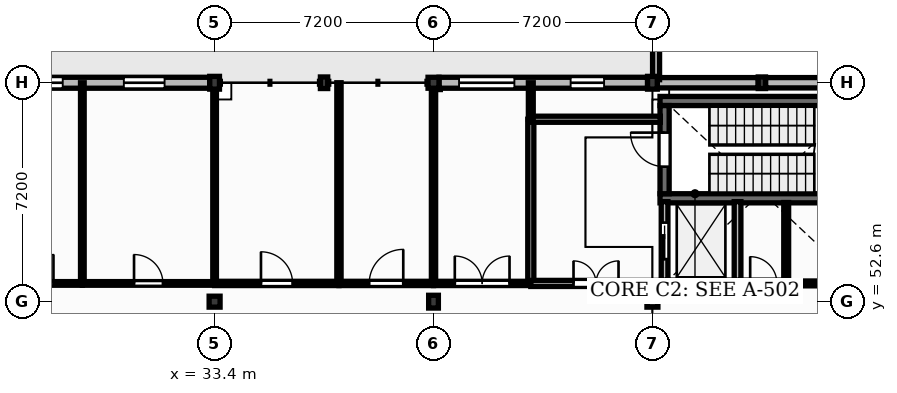
"""IFC4 building model, lengths in metres.
Left out: names, types, materials, properties, quantities, classifications, styles, units other than length and angle.
Written with IfcOpenShell. Run it as: python <this file> out.ifc"""

import sys

from ifc_helpers import new_model, si_unit, direction, frame, frame_2d, origin, origin_2d, place, context, subcontext, project, spatial, rectangle, extrude, element, fill, save


model = new_model("IFC4")
c1 = context("Model", 3, precision=1e-05, world=origin(), true_north=direction((0.0, 1.0)))
c2 = subcontext(c1, "Body", "Model", "MODEL_VIEW")
j1 = project(units=[si_unit("LENGTHUNIT", "METRE"), si_unit("PLANEANGLEUNIT", "RADIAN")], contexts=[c1])
p1 = place(None, origin())
s1 = spatial("IfcSite", under=j1, at=p1, CompositionType="ELEMENT")
p2 = place(p1, origin())
s2 = spatial("IfcBuilding", under=s1, at=p2, CompositionType="ELEMENT")
p3 = place(p2, frame((0.0, 0.0, 4.5)))
s3 = spatial("IfcBuildingStorey", under=s2, at=p3, CompositionType="ELEMENT", Elevation=4.5)
p4 = place(p3, frame((33.4, 52.6, 0.0), z_axis=(0.0, 0.0, 1.0), x_axis=(1.0, 0.0, 0.0)))
e1 = element("IfcColumn", 1, at=p4, inside=s3, PredefinedType="COLUMN", context=c2, shape_type="SweptSolid", body=[
    extrude(rectangle(XDim=0.36, YDim=0.36, at=origin_2d()), origin(), (0.0, 0.0, 1.0), 4.26),
])
for number, where, z_axis, x_axis in (
    (2, (33.4, 59.8, 0.0), (0.0, 0.0, 1.0), (1.0, 0.0, 0.0)),
    (3, (40.6, 52.6, 0.0), (0.0, 0.0, 1.0), (1.0, 0.0, 0.0)),
):
    element("IfcColumn", number, at=place(p3, frame(where, z_axis=z_axis, x_axis=x_axis)), inside=s3, PredefinedType="COLUMN", context=c2, shape_type="SweptSolid", body=[
        extrude(rectangle(XDim=0.32, YDim=0.42, at=origin_2d()), origin(), (0.0, 0.0, 1.0), 4.26),
    ])
for number, where, z_axis, x_axis in (
    (4, (40.6, 59.8, 0.0), (0.0, 0.0, 1.0), (1.0, 0.0, 0.0)),
    (5, (47.8, 52.6, 0.0), (0.0, 0.0, 1.0), (1.0, 0.0, 0.0)),
):
    element("IfcColumn", number, at=place(p3, frame(where, z_axis=z_axis, x_axis=x_axis)), inside=s3, PredefinedType="COLUMN", context=c2, shape_type="SweptSolid", body=[
        extrude(rectangle(XDim=0.36, YDim=0.36, at=origin_2d()), origin(), (0.0, 0.0, 1.0), 4.26),
    ])
p5 = place(p3, frame((47.8, 59.8, 0.0), z_axis=(0.0, 0.0, 1.0), x_axis=(1.0, 0.0, 0.0)))
e6 = element("IfcColumn", 6, at=p5, inside=s3, PredefinedType="COLUMN", context=c2, shape_type="SweptSolid", body=[
    extrude(rectangle(XDim=0.32, YDim=0.42, at=origin_2d()), origin(), (0.0, 0.0, 1.0), 4.26),
])
for number, where, z_axis, x_axis in (
    (7, (37.0, 59.8, 0.0), (0.0, 0.0, 1.0), (1.0, 0.0, 0.0)),
    (8, (51.4, 59.8, 0.0), (0.0, 0.0, 1.0), (1.0, 0.0, 0.0)),
):
    element("IfcColumn", number, at=place(p3, frame(where, z_axis=z_axis, x_axis=x_axis)), inside=s3, PredefinedType="PILASTER", context=c2, shape_type="SweptSolid", body=[
        extrude(rectangle(XDim=0.24, YDim=0.38, at=origin_2d()), origin(), (0.0, 0.0, 1.0), 4.26),
    ])
p6 = place(p3, frame((26.38, 59.8, 0.0), z_axis=(0.0, 0.0, 1.0), x_axis=(1.0, 0.0, 0.0)))
e9 = element("IfcWall", 9, at=p6, inside=s3, PredefinedType="SOLIDWALL", context=c2, shape_type="SweptSolid", body=[
    extrude(rectangle(XDim=6.86, YDim=0.36, at=frame_2d((3.43, 0.0))), origin(), (0.0, 0.0, 1.0), 3.8),
])
p7 = place(p6, frame((0.765, 0.0, 1.05)))
e10 = element("IfcOpeningElement", 10, at=p7, cuts=e9, PredefinedType="OPENING", context=c2, shape_type="SweptSolid", body=[
    extrude(rectangle(XDim=1.26, YDim=1.65, at=frame_2d((0.63, 0.825))), frame((0.0, 0.19, 0.0), z_axis=(0.0, -1.0, 0.0), x_axis=(1.0, 0.0, 0.0)), (0.0, 0.0, 1.0), 0.38),
])
p8 = place(p6, frame((4.035, 0.0, 1.0)))
e11 = element("IfcOpeningElement", 11, at=p8, cuts=e9, PredefinedType="OPENING", context=c2, shape_type="SweptSolid", body=[
    extrude(rectangle(XDim=1.34, YDim=1.95, at=frame_2d((0.67, 0.975))), frame((0.0, 0.19, 0.0), z_axis=(0.0, -1.0, 0.0), x_axis=(1.0, 0.0, 0.0)), (0.0, 0.0, 1.0), 0.38),
])
p9 = place(p3, frame((40.78, 59.8, 0.0), z_axis=(0.0, 0.0, 1.0), x_axis=(1.0, 0.0, 0.0)))
e12 = element("IfcWall", 12, at=p9, inside=s3, PredefinedType="SOLIDWALL", context=c2, shape_type="SweptSolid", body=[
    extrude(rectangle(XDim=6.86, YDim=0.36, at=frame_2d((3.43, 0.0))), origin(), (0.0, 0.0, 1.0), 3.8),
])
p10 = place(p9, frame((0.66, 0.0, 1.05)))
e13 = element("IfcOpeningElement", 13, at=p10, cuts=e12, PredefinedType="OPENING", context=c2, shape_type="SweptSolid", body=[
    extrude(rectangle(XDim=1.82, YDim=1.65, at=frame_2d((0.91, 0.825))), frame((0.0, 0.19, 0.0), z_axis=(0.0, -1.0, 0.0), x_axis=(1.0, 0.0, 0.0)), (0.0, 0.0, 1.0), 0.38),
])
p11 = place(p9, frame((4.33, 0.0, 1.0)))
e14 = element("IfcOpeningElement", 14, at=p11, cuts=e12, PredefinedType="OPENING", context=c2, shape_type="SweptSolid", body=[
    extrude(rectangle(XDim=1.1, YDim=1.8, at=frame_2d((0.55, 0.9))), frame((0.0, 0.19, 0.0), z_axis=(0.0, -1.0, 0.0), x_axis=(1.0, 0.0, 0.0)), (0.0, 0.0, 1.0), 0.38),
])
p12 = place(p3, frame((47.96, 59.8, 0.0), z_axis=(0.0, 0.0, 1.0), x_axis=(1.0, 0.0, 0.0)))
e15 = element("IfcWall", 15, at=p12, inside=s3, PredefinedType="SOLIDWALL", context=c2, shape_type="SweptSolid", body=[
    extrude(rectangle(XDim=3.32, YDim=0.34, at=frame_2d((1.66, 0.0))), origin(), (0.0, 0.0, 1.0), 3.8),
])
p13 = place(p3, frame((51.52, 59.8, 0.0), z_axis=(0.0, 0.0, 1.0), x_axis=(1.0, 0.0, 0.0)))
e16 = element("IfcWall", 16, at=p13, inside=s3, PredefinedType="SOLIDWALL", context=c2, shape_type="SweptSolid", body=[
    extrude(rectangle(XDim=3.3, YDim=0.34, at=frame_2d((1.65, 0.0))), origin(), (0.0, 0.0, 1.0), 3.8),
])
p14 = place(p3, frame((47.92, 59.9, -0.05), z_axis=(0.0, 0.0, 1.0), x_axis=(0.0, 1.0, 0.0)))
e17 = element("IfcWall", 17, at=p14, inside=s3, PredefinedType="PARAPET", context=c2, shape_type="SweptSolid", body=[
    extrude(rectangle(XDim=1.68, YDim=0.23, at=frame_2d((0.84, 0.0))), origin(), (0.0, 0.0, 1.0), 0.8),
])
for number, where, z_axis, x_axis in (
    (18, (48.05, 56.0, 0.0), (0.0, 0.0, 1.0), (1.0, 0.0, 0.0)),
    (19, (48.05, 59.2, 0.0), (0.0, 0.0, 1.0), (1.0, 0.0, 0.0)),
):
    element("IfcWall", number, at=place(p3, frame(where, z_axis=z_axis, x_axis=x_axis)), inside=s3, PredefinedType="SHEAR", context=c2, shape_type="SweptSolid", body=[
        extrude(rectangle(XDim=6.7, YDim=0.3, at=frame_2d((3.35, 0.0))), origin(), (0.0, 0.0, 1.0), 4.25),
    ])
p15 = place(p3, frame((48.2, 56.15, 0.0), z_axis=(0.0, 0.0, 1.0), x_axis=(0.0, 1.0, 0.0)))
e20 = element("IfcWall", 20, at=p15, inside=s3, PredefinedType="SHEAR", context=c2, shape_type="SweptSolid", body=[
    extrude(rectangle(XDim=2.9, YDim=0.3, at=frame_2d((1.45, 0.0))), origin(), (0.0, 0.0, 1.0), 4.25),
])
p16 = place(p15, frame((0.89, 0.0, 0.0)))
e21 = element("IfcOpeningElement", 21, at=p16, cuts=e20, PredefinedType="OPENING", context=c2, shape_type="SweptSolid", body=[
    extrude(rectangle(XDim=1.12, YDim=2.1, at=frame_2d((0.56, 1.05))), frame((0.0, 0.16, 0.0), z_axis=(0.0, -1.0, 0.0), x_axis=(1.0, 0.0, 0.0)), (0.0, 0.0, 1.0), 0.32),
])
p17 = place(p3, frame((48.2, 53.2, 0.0), z_axis=(0.0, 0.0, 1.0), x_axis=(1.0, 0.0, 0.0)))
e22 = element("IfcWall", 22, at=p17, inside=s3, PredefinedType="SOLIDWALL", context=c2, shape_type="SweptSolid", body=[
    extrude(rectangle(XDim=2.4, YDim=0.22, at=frame_2d((1.2, 0.0))), origin(), (0.0, 0.0, 1.0), 4.25),
])
p18 = place(p3, frame((48.2, 53.31, 0.0), z_axis=(0.0, 0.0, 1.0), x_axis=(0.0, 1.0, 0.0)))
e23 = element("IfcWall", 23, at=p18, inside=s3, PredefinedType="SOLIDWALL", context=c2, shape_type="SweptSolid", body=[
    extrude(rectangle(XDim=2.58, YDim=0.22, at=frame_2d((1.29, 0.0))), origin(), (0.0, 0.0, 1.0), 4.25),
])
p19 = place(p18, frame((0.69, 0.0, 0.0)))
e24 = element("IfcOpeningElement", 24, at=p19, cuts=e23, PredefinedType="OPENING", context=c2, shape_type="SweptSolid", body=[
    extrude(rectangle(XDim=1.2, YDim=2.15, at=frame_2d((0.6, 1.075))), frame((0.0, 0.12, 0.0), z_axis=(0.0, -1.0, 0.0), x_axis=(1.0, 0.0, 0.0)), (0.0, 0.0, 1.0), 0.24),
])
p20 = place(p3, frame((50.6, 53.31, 0.0), z_axis=(0.0, 0.0, 1.0), x_axis=(0.0, 1.0, 0.0)))
e25 = element("IfcWall", 25, at=p20, inside=s3, PredefinedType="SOLIDWALL", context=c2, shape_type="SweptSolid", body=[
    extrude(rectangle(XDim=2.58, YDim=0.22, at=frame_2d((1.29, 0.0))), origin(), (0.0, 0.0, 1.0), 4.25),
])
p21 = place(p3, frame((26.2, 53.2, 0.0), z_axis=(0.0, 0.0, 1.0), x_axis=(1.0, 0.0, 0.0)))
e26 = element("IfcWall", 26, at=p21, inside=s3, PredefinedType="PLUMBINGWALL", context=c2, shape_type="SweptSolid", body=[
    extrude(rectangle(XDim=2.85, YDim=0.12, at=frame_2d((1.425, 0.0))), origin(), (0.0, 0.0, 1.0), 4.18),
])
p22 = place(p21, frame((0.95, 0.0, 0.0)))
e27 = element("IfcOpeningElement", 27, at=p22, cuts=e26, PredefinedType="OPENING", context=c2, shape_type="SweptSolid", body=[
    extrude(rectangle(XDim=0.95, YDim=2.1, at=frame_2d((0.475, 1.05))), frame((0.0, 0.07, 0.0), z_axis=(0.0, -1.0, 0.0), x_axis=(1.0, 0.0, 0.0)), (0.0, 0.0, 1.0), 0.14),
])
p23 = place(p3, frame((29.05, 53.27, 0.0), z_axis=(0.0, 0.0, 1.0), x_axis=(0.0, 1.0, 0.0)))
e28 = element("IfcWall", 28, at=p23, inside=s3, PredefinedType="PLUMBINGWALL", context=c2, shape_type="SweptSolid", body=[
    extrude(rectangle(XDim=6.53, YDim=0.12, at=frame_2d((3.265, 0.0))), origin(), (0.0, 0.0, 1.0), 4.18),
])
p24 = place(p3, frame((29.05, 53.2, 0.0), z_axis=(0.0, 0.0, 1.0), x_axis=(1.0, 0.0, 0.0)))
e29 = element("IfcWall", 29, at=p24, inside=s3, PredefinedType="PLUMBINGWALL", context=c2, shape_type="SweptSolid", body=[
    extrude(rectangle(XDim=4.35, YDim=0.12, at=frame_2d((2.175, 0.0))), origin(), (0.0, 0.0, 1.0), 4.18),
])
p25 = place(p24, frame((1.7, 0.0, 0.0)))
e30 = element("IfcOpeningElement", 30, at=p25, cuts=e29, PredefinedType="OPENING", context=c2, shape_type="SweptSolid", body=[
    extrude(rectangle(XDim=0.95, YDim=2.1, at=frame_2d((0.475, 1.05))), frame((0.0, 0.07, 0.0), z_axis=(0.0, -1.0, 0.0), x_axis=(1.0, 0.0, 0.0)), (0.0, 0.0, 1.0), 0.14),
])
p26 = place(p3, frame((33.4, 53.27, 0.0), z_axis=(0.0, 0.0, 1.0), x_axis=(0.0, 1.0, 0.0)))
e31 = element("IfcWall", 31, at=p26, inside=s3, PredefinedType="PLUMBINGWALL", context=c2, shape_type="SweptSolid", body=[
    extrude(rectangle(XDim=6.32, YDim=0.12, at=frame_2d((3.16, 0.0))), origin(), (0.0, 0.0, 1.0), 3.74),
])
p27 = place(p3, frame((33.4, 53.2, 0.0), z_axis=(0.0, 0.0, 1.0), x_axis=(1.0, 0.0, 0.0)))
e32 = element("IfcWall", 32, at=p27, inside=s3, PredefinedType="PARTITIONING", context=c2, shape_type="SweptSolid", body=[
    extrude(rectangle(XDim=4.09, YDim=0.14, at=frame_2d((2.045, 0.0))), origin(), (0.0, 0.0, 1.0), 4.18),
])
p28 = place(p27, frame((1.525, 0.0, 0.0)))
e33 = element("IfcOpeningElement", 33, at=p28, cuts=e32, PredefinedType="OPENING", context=c2, shape_type="SweptSolid", body=[
    extrude(rectangle(XDim=1.04, YDim=2.1, at=frame_2d((0.52, 1.05))), frame((0.0, 0.08, 0.0), z_axis=(0.0, -1.0, 0.0), x_axis=(1.0, 0.0, 0.0)), (0.0, 0.0, 1.0), 0.16),
])
p29 = place(p3, frame((37.49, 53.27, 0.0), z_axis=(0.0, 0.0, 1.0), x_axis=(0.0, 1.0, 0.0)))
e34 = element("IfcWall", 34, at=p29, inside=s3, PredefinedType="PARTITIONING", context=c2, shape_type="SweptSolid", body=[
    extrude(rectangle(XDim=6.53, YDim=0.14, at=frame_2d((3.265, 0.0))), origin(), (0.0, 0.0, 1.0), 4.18),
])
p30 = place(p3, frame((37.49, 53.2, 0.0), z_axis=(0.0, 0.0, 1.0), x_axis=(1.0, 0.0, 0.0)))
e35 = element("IfcWall", 35, at=p30, inside=s3, PredefinedType="PARTITIONING", context=c2, shape_type="SweptSolid", body=[
    extrude(rectangle(XDim=3.11, YDim=0.14, at=frame_2d((1.555, 0.0))), origin(), (0.0, 0.0, 1.0), 4.18),
])
p31 = place(p30, frame((0.995, 0.0, 0.0)))
e36 = element("IfcOpeningElement", 36, at=p31, cuts=e35, PredefinedType="OPENING", context=c2, shape_type="SweptSolid", body=[
    extrude(rectangle(XDim=1.12, YDim=2.15, at=frame_2d((0.56, 1.075))), frame((0.0, 0.08, 0.0), z_axis=(0.0, -1.0, 0.0), x_axis=(1.0, 0.0, 0.0)), (0.0, 0.0, 1.0), 0.16),
])
p32 = place(p3, frame((40.6, 53.27, 0.0), z_axis=(0.0, 0.0, 1.0), x_axis=(0.0, 1.0, 0.0)))
e37 = element("IfcWall", 37, at=p32, inside=s3, PredefinedType="PARTITIONING", context=c2, shape_type="SweptSolid", body=[
    extrude(rectangle(XDim=6.35, YDim=0.14, at=frame_2d((3.175, 0.0))), origin(), (0.0, 0.0, 1.0), 3.74),
])
p33 = place(p3, frame((40.6, 53.2, 0.0), z_axis=(0.0, 0.0, 1.0), x_axis=(1.0, 0.0, 0.0)))
e38 = element("IfcWall", 38, at=p33, inside=s3, PredefinedType="PARTITIONING", context=c2, shape_type="SweptSolid", body=[
    extrude(rectangle(XDim=3.2, YDim=0.14, at=frame_2d((1.6, 0.0))), origin(), (0.0, 0.0, 1.0), 4.18),
])
p34 = place(p33, frame((0.7, 0.0, 0.0)))
e39 = element("IfcOpeningElement", 39, at=p34, cuts=e38, PredefinedType="OPENING", context=c2, shape_type="SweptSolid", body=[
    extrude(rectangle(XDim=1.8, YDim=2.3, at=frame_2d((0.9, 1.15))), frame((0.0, 0.08, 0.0), z_axis=(0.0, -1.0, 0.0), x_axis=(1.0, 0.0, 0.0)), (0.0, 0.0, 1.0), 0.16),
])
p35 = place(p3, frame((43.8, 53.27, 0.0), z_axis=(0.0, 0.0, 1.0), x_axis=(0.0, 1.0, 0.0)))
e40 = element("IfcWall", 40, at=p35, inside=s3, PredefinedType="PARTITIONING", context=c2, shape_type="SweptSolid", body=[
    extrude(rectangle(XDim=5.33, YDim=0.2, at=frame_2d((2.665, 0.0))), origin(), (0.0, 0.0, 1.0), 4.18),
])
p36 = place(p3, frame((43.8, 53.2, 0.0), z_axis=(0.0, 0.0, 1.0), x_axis=(1.0, 0.0, 0.0)))
e41 = element("IfcWall", 41, at=p36, inside=s3, PredefinedType="PARTITIONING", context=c2, shape_type="SweptSolid", body=[
    extrude(rectangle(XDim=4.29, YDim=0.2, at=frame_2d((2.145, 0.0))), origin(), (0.0, 0.0, 1.0), 4.18),
])
p37 = place(p36, frame((1.405, 0.0, 0.0)))
e42 = element("IfcOpeningElement", 42, at=p37, cuts=e41, PredefinedType="OPENING", context=c2, shape_type="SweptSolid", body=[
    extrude(rectangle(XDim=1.48, YDim=2.25, at=frame_2d((0.74, 1.125))), frame((0.0, 0.11, 0.0), z_axis=(0.0, -1.0, 0.0), x_axis=(1.0, 0.0, 0.0)), (0.0, 0.0, 1.0), 0.22),
])
p38 = place(p3, frame((50.71, 53.2, 0.0), z_axis=(0.0, 0.0, 1.0), x_axis=(1.0, 0.0, 0.0)))
e43 = element("IfcWall", 43, at=p38, inside=s3, PredefinedType="SOLIDWALL", context=c2, shape_type="SweptSolid", body=[
    extrude(rectangle(XDim=1.49, YDim=0.22, at=frame_2d((0.745, 0.0))), origin(), (0.0, 0.0, 1.0), 4.18),
])
p39 = place(p38, frame((0.305, 0.0, 0.0)))
e44 = element("IfcOpeningElement", 44, at=p39, cuts=e43, PredefinedType="OPENING", context=c2, shape_type="SweptSolid", body=[
    extrude(rectangle(XDim=0.88, YDim=2.05, at=frame_2d((0.44, 1.025))), frame((0.0, 0.12, 0.0), z_axis=(0.0, -1.0, 0.0), x_axis=(1.0, 0.0, 0.0)), (0.0, 0.0, 1.0), 0.24),
])
p40 = place(p3, frame((52.2, 53.27, 0.0), z_axis=(0.0, 0.0, 1.0), x_axis=(0.0, 1.0, 0.0)))
e45 = element("IfcWall", 45, at=p40, inside=s3, PredefinedType="PARTITIONING", context=c2, shape_type="SweptSolid", body=[
    extrude(rectangle(XDim=2.59, YDim=0.16, at=frame_2d((1.295, 0.0))), origin(), (0.0, 0.0, 1.0), 4.18),
])
p41 = place(p3, frame((48.06, 58.6, 0.0), z_axis=(0.0, 0.0, 1.0), x_axis=(-1.0, 0.0, 0.0)))
e46 = element("IfcWall", 46, at=p41, inside=s3, PredefinedType="PARTITIONING", context=c2, shape_type="SweptSolid", body=[
    extrude(rectangle(XDim=4.26, YDim=0.2, at=frame_2d((2.13, 0.0))), origin(), (0.0, 0.0, 1.0), 4.18),
])
p42 = place(p3, frame((55.0, 53.2, 0.0), z_axis=(0.0, 0.0, 1.0), x_axis=(-1.0, 0.0, 0.0)))
e47 = element("IfcWall", 47, at=p42, inside=s3, PredefinedType="PARTITIONING", context=c2, shape_type="SweptSolid", body=[
    extrude(rectangle(XDim=2.8, YDim=0.16, at=frame_2d((1.4, 0.0))), origin(), (0.0, 0.0, 1.0), 4.18),
])
p43 = place(p3, frame((43.8, 58.6, 0.0), z_axis=(0.0, 0.0, 1.0), x_axis=(0.0, 1.0, 0.0)))
e48 = element("IfcWall", 48, at=p43, inside=s3, PredefinedType="PARTITIONING", context=c2, shape_type="SweptSolid", body=[
    extrude(rectangle(XDim=1.2, YDim=0.16, at=frame_2d((0.6, 0.0))), origin(), (0.0, 0.0, 1.0), 4.18),
])
p44 = place(p7, origin())
e49 = element("IfcWindow", 49, at=p44, inside=s3, PartitioningType="SINGLE_PANEL", PredefinedType="WINDOW", context=c2, shape_type="SweptSolid", body=[
    extrude(rectangle(XDim=1.26, YDim=1.65, at=frame_2d((0.63, 0.825))), frame((0.0, 0.03, 0.0), z_axis=(0.0, -1.0, 0.0), x_axis=(1.0, 0.0, 0.0)), (0.0, 0.0, 1.0), 0.06),
])
fill(e10, e49)
p45 = place(p8, origin())
e50 = element("IfcWindow", 50, at=p45, inside=s3, PartitioningType="SINGLE_PANEL", PredefinedType="WINDOW", context=c2, shape_type="SweptSolid", body=[
    extrude(rectangle(XDim=1.34, YDim=1.95, at=frame_2d((0.67, 0.975))), frame((0.0, 0.03, 0.0), z_axis=(0.0, -1.0, 0.0), x_axis=(1.0, 0.0, 0.0)), (0.0, 0.0, 1.0), 0.06),
])
fill(e11, e50)
p46 = place(p10, origin())
e51 = element("IfcWindow", 51, at=p46, inside=s3, PartitioningType="DOUBLE_PANEL_VERTICAL", PredefinedType="WINDOW", context=c2, shape_type="SweptSolid", body=[
    extrude(rectangle(XDim=1.82, YDim=1.65, at=frame_2d((0.91, 0.825))), frame((0.0, 0.03, 0.0), z_axis=(0.0, -1.0, 0.0), x_axis=(1.0, 0.0, 0.0)), (0.0, 0.0, 1.0), 0.06),
])
fill(e13, e51)
p47 = place(p11, origin())
e52 = element("IfcWindow", 52, at=p47, inside=s3, PartitioningType="SINGLE_PANEL", PredefinedType="WINDOW", context=c2, shape_type="SweptSolid", body=[
    extrude(rectangle(XDim=1.1, YDim=1.8, at=frame_2d((0.55, 0.9))), frame((0.0, 0.03, 0.0), z_axis=(0.0, -1.0, 0.0), x_axis=(1.0, 0.0, 0.0)), (0.0, 0.0, 1.0), 0.06),
])
fill(e14, e52)
p48 = place(p19, origin())
e53 = element("IfcDoor", 53, at=p48, inside=s3, OperationType="SLIDING_TO_LEFT", PredefinedType="DOOR", context=c2, shape_type="SweptSolid", body=[
    extrude(rectangle(XDim=1.2, YDim=2.15, at=frame_2d((0.6, 1.075))), frame((0.0, 0.025, 0.0), z_axis=(0.0, -1.0, 0.0), x_axis=(1.0, 0.0, 0.0)), (0.0, 0.0, 1.0), 0.05),
])
fill(e24, e53)
p49 = place(p16, origin())
e54 = element("IfcDoor", 54, at=p49, inside=s3, OperationType="SINGLE_SWING_RIGHT", PredefinedType="DOOR", context=c2, shape_type="SweptSolid", body=[
    extrude(rectangle(XDim=1.12, YDim=2.1, at=frame_2d((0.56, 1.05))), frame((0.0, 0.025, 0.0), z_axis=(0.0, -1.0, 0.0), x_axis=(1.0, 0.0, 0.0)), (0.0, 0.0, 1.0), 0.05),
])
fill(e21, e54)
p50 = place(p37, origin())
e55 = element("IfcDoor", 55, at=p50, inside=s3, OperationType="DOUBLE_DOOR_SINGLE_SWING", PredefinedType="DOOR", context=c2, shape_type="SweptSolid", body=[
    extrude(rectangle(XDim=1.48, YDim=2.25, at=frame_2d((0.74, 1.125))), frame((0.0, 0.025, 0.0), z_axis=(0.0, -1.0, 0.0), x_axis=(1.0, 0.0, 0.0)), (0.0, 0.0, 1.0), 0.05),
])
fill(e42, e55)
p51 = place(p39, origin())
e56 = element("IfcDoor", 56, at=p51, inside=s3, OperationType="SINGLE_SWING_LEFT", PredefinedType="DOOR", context=c2, shape_type="SweptSolid", body=[
    extrude(rectangle(XDim=0.88, YDim=2.05, at=frame_2d((0.44, 1.025))), frame((0.0, 0.025, 0.0), z_axis=(0.0, -1.0, 0.0), x_axis=(1.0, 0.0, 0.0)), (0.0, 0.0, 1.0), 0.05),
])
fill(e44, e56)
p52 = place(p22, origin())
e57 = element("IfcDoor", 57, at=p52, inside=s3, OperationType="SINGLE_SWING_RIGHT", PredefinedType="DOOR", context=c2, shape_type="SweptSolid", body=[
    extrude(rectangle(XDim=0.95, YDim=2.1, at=frame_2d((0.475, 1.05))), frame((0.0, 0.025, 0.0), z_axis=(0.0, -1.0, 0.0), x_axis=(1.0, 0.0, 0.0)), (0.0, 0.0, 1.0), 0.05),
])
fill(e27, e57)
p53 = place(p25, origin())
e58 = element("IfcDoor", 58, at=p53, inside=s3, OperationType="SINGLE_SWING_LEFT", PredefinedType="DOOR", context=c2, shape_type="SweptSolid", body=[
    extrude(rectangle(XDim=0.95, YDim=2.1, at=frame_2d((0.475, 1.05))), frame((0.0, 0.025, 0.0), z_axis=(0.0, -1.0, 0.0), x_axis=(1.0, 0.0, 0.0)), (0.0, 0.0, 1.0), 0.05),
])
fill(e30, e58)
p54 = place(p28, origin())
e59 = element("IfcDoor", 59, at=p54, inside=s3, OperationType="SINGLE_SWING_LEFT", PredefinedType="DOOR", context=c2, shape_type="SweptSolid", body=[
    extrude(rectangle(XDim=1.04, YDim=2.1, at=frame_2d((0.52, 1.05))), frame((0.0, 0.025, 0.0), z_axis=(0.0, -1.0, 0.0), x_axis=(1.0, 0.0, 0.0)), (0.0, 0.0, 1.0), 0.05),
])
fill(e33, e59)
p55 = place(p31, origin())
e60 = element("IfcDoor", 60, at=p55, inside=s3, OperationType="SINGLE_SWING_RIGHT", PredefinedType="DOOR", context=c2, shape_type="SweptSolid", body=[
    extrude(rectangle(XDim=1.12, YDim=2.15, at=frame_2d((0.56, 1.075))), frame((0.0, 0.025, 0.0), z_axis=(0.0, -1.0, 0.0), x_axis=(1.0, 0.0, 0.0)), (0.0, 0.0, 1.0), 0.05),
])
fill(e36, e60)
p56 = place(p34, origin())
e61 = element("IfcDoor", 61, at=p56, inside=s3, OperationType="DOUBLE_DOOR_SINGLE_SWING", PredefinedType="DOOR", context=c2, shape_type="SweptSolid", body=[
    extrude(rectangle(XDim=1.8, YDim=2.3, at=frame_2d((0.9, 1.15))), frame((0.0, 0.025, 0.0), z_axis=(0.0, -1.0, 0.0), x_axis=(1.0, 0.0, 0.0)), (0.0, 0.0, 1.0), 0.05),
])
fill(e39, e61)
save(model, sys.argv[1])
